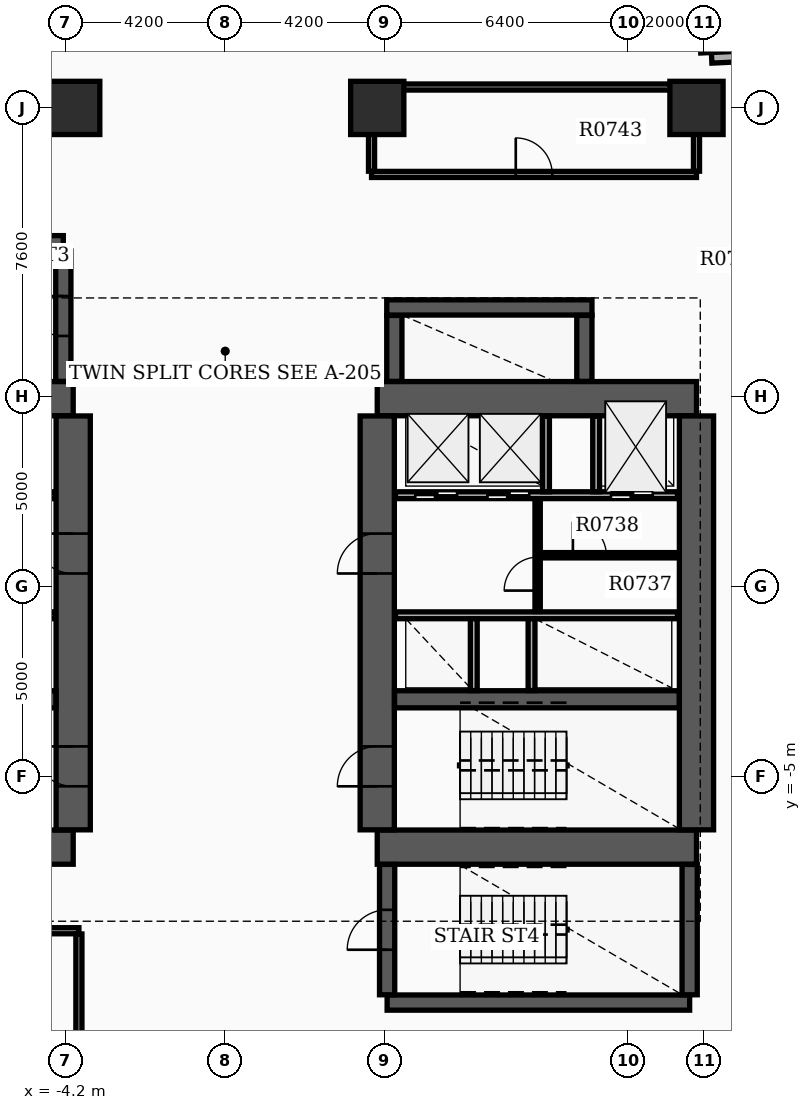
"""IFC4 building model, lengths in metres.
Left out: names, types, materials, properties, quantities, classifications, styles, units other than length and angle.
Written with IfcOpenShell. Run it as: python <this file> out.ifc"""

import sys

from ifc_helpers import new_model, si_unit, direction, frame, frame_2d, origin, origin_2d, place, context, subcontext, project, spatial, rectangle, extrude, element, fill, save


model = new_model("IFC4")
c1 = context("Model", 3, precision=1e-05, world=origin(), true_north=direction((0.0, 1.0)))
c2 = subcontext(c1, "Body", "Model", "MODEL_VIEW")
j1 = project(units=[si_unit("LENGTHUNIT", "METRE"), si_unit("PLANEANGLEUNIT", "RADIAN")], contexts=[c1])
p1 = place(None, origin())
s1 = spatial("IfcSite", under=j1, at=p1, CompositionType="ELEMENT")
p2 = place(p1, origin())
s2 = spatial("IfcBuilding", under=s1, at=p2, CompositionType="ELEMENT")
p3 = place(p2, frame((0.0, 0.0, 52.2)))
s3 = spatial("IfcBuildingStorey", under=s2, at=p3, CompositionType="ELEMENT", Elevation=52.2)
for number, where, z_axis, x_axis in (
    (1, (-12.4, -6.85, 0.0), (0.0, 0.0, 1.0), (1.0, 0.0, 0.0)),
    (2, (-12.4, 4.95, 0.0), (0.0, 0.0, 1.0), (1.0, 0.0, 0.0)),
):
    element("IfcWall", number, at=place(p3, frame(where, z_axis=z_axis, x_axis=x_axis)), inside=s3, PredefinedType="SHEAR", context=c2, shape_type="SweptSolid", body=[
        extrude(rectangle(XDim=8.4, YDim=0.9, at=frame_2d((4.2, 0.0))), origin(), (0.0, 0.0, 1.0), 3.7),
    ])
p4 = place(p3, frame((-4.0, -6.395, 0.0), z_axis=(0.0, 0.0, 1.0), x_axis=(0.0, 1.0, 0.0)))
e3 = element("IfcWall", 3, at=p4, inside=s3, PredefinedType="SHEAR", context=c2, shape_type="SweptSolid", body=[
    extrude(rectangle(XDim=10.89, YDim=0.9, at=frame_2d((5.445, 0.0))), origin(), (0.0, 0.0, 1.0), 3.7),
])
p5 = place(p4, frame((1.145, 0.0, 0.0)))
e4 = element("IfcOpeningElement", 4, at=p5, cuts=e3, PredefinedType="OPENING", context=c2, shape_type="SweptSolid", body=[
    extrude(rectangle(XDim=1.05, YDim=2.15, at=frame_2d((0.525, 1.075))), frame((0.0, 0.46, 0.0), z_axis=(0.0, -1.0, 0.0), x_axis=(1.0, 0.0, 0.0)), (0.0, 0.0, 1.0), 0.92),
])
p6 = place(p4, frame((6.745, 0.0, 0.0)))
e5 = element("IfcOpeningElement", 5, at=p6, cuts=e3, PredefinedType="OPENING", context=c2, shape_type="SweptSolid", body=[
    extrude(rectangle(XDim=1.05, YDim=2.15, at=frame_2d((0.525, 1.075))), frame((0.0, 0.46, 0.0), z_axis=(0.0, -1.0, 0.0), x_axis=(1.0, 0.0, 0.0)), (0.0, 0.0, 1.0), 0.92),
])
p7 = place(p3, frame((-11.945, -2.96, 0.0), z_axis=(0.0, 0.0, 1.0), x_axis=(1.0, 0.0, 0.0)))
e6 = element("IfcWall", 6, at=p7, inside=s3, PredefinedType="SHEAR", context=c2, shape_type="SweptSolid", body=[
    extrude(rectangle(XDim=7.49, YDim=0.45, at=frame_2d((3.745, 0.0))), origin(), (0.0, 0.0, 1.0), 3.7),
])
for number, where, z_axis, x_axis in (
    (7, (4.0, -6.85, 0.0), (0.0, 0.0, 1.0), (1.0, 0.0, 0.0)),
    (8, (4.0, 4.95, 0.0), (0.0, 0.0, 1.0), (1.0, 0.0, 0.0)),
):
    element("IfcWall", number, at=place(p3, frame(where, z_axis=z_axis, x_axis=x_axis)), inside=s3, PredefinedType="SHEAR", context=c2, shape_type="SweptSolid", body=[
        extrude(rectangle(XDim=8.4, YDim=0.9, at=frame_2d((4.2, 0.0))), origin(), (0.0, 0.0, 1.0), 3.7),
    ])
p8 = place(p3, frame((4.0, -6.395, 0.0), z_axis=(0.0, 0.0, 1.0), x_axis=(0.0, 1.0, 0.0)))
e9 = element("IfcWall", 9, at=p8, inside=s3, PredefinedType="SHEAR", context=c2, shape_type="SweptSolid", body=[
    extrude(rectangle(XDim=10.89, YDim=0.9, at=frame_2d((5.445, 0.0))), origin(), (0.0, 0.0, 1.0), 3.7),
])
p9 = place(p8, frame((1.145, 0.0, 0.0)))
e10 = element("IfcOpeningElement", 10, at=p9, cuts=e9, PredefinedType="OPENING", context=c2, shape_type="SweptSolid", body=[
    extrude(rectangle(XDim=1.05, YDim=2.15, at=frame_2d((0.525, 1.075))), frame((0.0, 0.46, 0.0), z_axis=(0.0, -1.0, 0.0), x_axis=(1.0, 0.0, 0.0)), (0.0, 0.0, 1.0), 0.92),
])
p10 = place(p8, frame((6.745, 0.0, 0.0)))
e11 = element("IfcOpeningElement", 11, at=p10, cuts=e9, PredefinedType="OPENING", context=c2, shape_type="SweptSolid", body=[
    extrude(rectangle(XDim=1.05, YDim=2.15, at=frame_2d((0.525, 1.075))), frame((0.0, 0.46, 0.0), z_axis=(0.0, -1.0, 0.0), x_axis=(1.0, 0.0, 0.0)), (0.0, 0.0, 1.0), 0.92),
])
p11 = place(p3, frame((12.4, -6.395, 0.0), z_axis=(0.0, 0.0, 1.0), x_axis=(0.0, 1.0, 0.0)))
e12 = element("IfcWall", 12, at=p11, inside=s3, PredefinedType="SHEAR", context=c2, shape_type="SweptSolid", body=[
    extrude(rectangle(XDim=10.89, YDim=0.9, at=frame_2d((5.445, 0.0))), origin(), (0.0, 0.0, 1.0), 3.7),
])
p12 = place(p3, frame((4.455, -2.96, 0.0), z_axis=(0.0, 0.0, 1.0), x_axis=(1.0, 0.0, 0.0)))
e13 = element("IfcWall", 13, at=p12, inside=s3, PredefinedType="SHEAR", context=c2, shape_type="SweptSolid", body=[
    extrude(rectangle(XDim=7.49, YDim=0.45, at=frame_2d((3.745, 0.0))), origin(), (0.0, 0.0, 1.0), 3.7),
])
p13 = place(p3, frame((-12.22, 9.04, 0.0), z_axis=(0.0, 0.0, 1.0), x_axis=(1.0, 0.0, 0.0)))
e14 = element("IfcWall", 14, at=p13, inside=s3, PredefinedType="SHEAR", context=c2, shape_type="SweptSolid", body=[
    extrude(rectangle(XDim=7.96, YDim=0.4, at=frame_2d((3.98, 0.0))), origin(), (0.0, 0.0, 1.0), 3.7),
])
p14 = place(p3, frame((-4.26, 5.405, 0.0), z_axis=(0.0, 0.0, 1.0), x_axis=(0.0, 1.0, 0.0)))
e15 = element("IfcWall", 15, at=p14, inside=s3, PredefinedType="SHEAR", context=c2, shape_type="SweptSolid", body=[
    extrude(rectangle(XDim=3.43, YDim=0.4, at=frame_2d((1.715, 0.0))), origin(), (0.0, 0.0, 1.0), 3.7),
])
p15 = place(p14, frame((1.195, 0.0, 0.0)))
e16 = element("IfcOpeningElement", 16, at=p15, cuts=e15, PredefinedType="OPENING", context=c2, shape_type="SweptSolid", body=[
    extrude(rectangle(XDim=1.05, YDim=2.15, at=frame_2d((0.525, 1.075))), frame((0.0, 0.21, 0.0), z_axis=(0.0, -1.0, 0.0), x_axis=(1.0, 0.0, 0.0)), (0.0, 0.0, 1.0), 0.42),
])
p16 = place(p3, frame((4.26, -10.94, 0.0), z_axis=(0.0, 0.0, 1.0), x_axis=(1.0, 0.0, 0.0)))
e17 = element("IfcWall", 17, at=p16, inside=s3, PredefinedType="SHEAR", context=c2, shape_type="SweptSolid", body=[
    extrude(rectangle(XDim=7.96, YDim=0.4, at=frame_2d((3.98, 0.0))), origin(), (0.0, 0.0, 1.0), 3.7),
])
p17 = place(p3, frame((4.26, -10.735, 0.0), z_axis=(0.0, 0.0, 1.0), x_axis=(0.0, 1.0, 0.0)))
e18 = element("IfcWall", 18, at=p17, inside=s3, PredefinedType="SHEAR", context=c2, shape_type="SweptSolid", body=[
    extrude(rectangle(XDim=3.43, YDim=0.4, at=frame_2d((1.715, 0.0))), origin(), (0.0, 0.0, 1.0), 3.7),
])
p18 = place(p17, frame((1.185, 0.0, 0.0)))
e19 = element("IfcOpeningElement", 19, at=p18, cuts=e18, PredefinedType="OPENING", context=c2, shape_type="SweptSolid", body=[
    extrude(rectangle(XDim=1.05, YDim=2.15, at=frame_2d((0.525, 1.075))), frame((0.0, 0.21, 0.0), z_axis=(0.0, -1.0, 0.0), x_axis=(1.0, 0.0, 0.0)), (0.0, 0.0, 1.0), 0.42),
])
p19 = place(p3, frame((12.22, -10.735, 0.0), z_axis=(0.0, 0.0, 1.0), x_axis=(0.0, 1.0, 0.0)))
e20 = element("IfcWall", 20, at=p19, inside=s3, PredefinedType="SHEAR", context=c2, shape_type="SweptSolid", body=[
    extrude(rectangle(XDim=3.43, YDim=0.4, at=frame_2d((1.715, 0.0))), origin(), (0.0, 0.0, 1.0), 3.7),
])
p20 = place(p3, frame((4.45, 5.405, 0.0), z_axis=(0.0, 0.0, 1.0), x_axis=(0.0, 1.0, 0.0)))
e21 = element("IfcWall", 21, at=p20, inside=s3, PredefinedType="SHEAR", context=c2, shape_type="SweptSolid", body=[
    extrude(rectangle(XDim=1.735, YDim=0.4, at=frame_2d((0.867, 0.0))), origin(), (0.0, 0.0, 1.0), 3.7),
])
p21 = place(p3, frame((4.25, 7.35, 0.0), z_axis=(0.0, 0.0, 1.0), x_axis=(1.0, 0.0, 0.0)))
e22 = element("IfcWall", 22, at=p21, inside=s3, PredefinedType="SHEAR", context=c2, shape_type="SweptSolid", body=[
    extrude(rectangle(XDim=5.4, YDim=0.4, at=frame_2d((2.7, 0.0))), origin(), (0.0, 0.0, 1.0), 3.7),
])
p22 = place(p3, frame((9.45, 5.405, 0.0), z_axis=(0.0, 0.0, 1.0), x_axis=(0.0, 1.0, 0.0)))
e23 = element("IfcWall", 23, at=p22, inside=s3, PredefinedType="SHEAR", context=c2, shape_type="SweptSolid", body=[
    extrude(rectangle(XDim=1.735, YDim=0.4, at=frame_2d((0.867, 0.0))), origin(), (0.0, 0.0, 1.0), 3.7),
])
for number, where, z_axis, x_axis in (
    (24, (12.4, 12.6, 0.0), (0.0, 0.0, 1.0), (1.0, 0.0, 0.0)),
    (25, (4.0, 12.6, 0.0), (0.0, 0.0, 1.0), (1.0, 0.0, 0.0)),
    (26, (-4.0, 12.6, 0.0), (0.0, 0.0, 1.0), (1.0, 0.0, 0.0)),
):
    element("IfcColumn", number, at=place(p3, frame(where, z_axis=z_axis, x_axis=x_axis)), inside=s3, PredefinedType="COLUMN", context=c2, shape_type="SweptSolid", body=[
        extrude(rectangle(XDim=1.4, YDim=1.4, at=origin_2d()), origin(), (0.0, 0.0, 1.0), 3.9),
    ])
p23 = place(p3, frame((14.017, 13.976, 0.0), z_axis=(0.0, 0.0, 1.0), x_axis=(-0.998883930236, -0.047232339719, 0.0)))
e27 = element("IfcWall", 27, at=p23, inside=s3, PredefinedType="STANDARD", context=c2, shape_type="SweptSolid", body=[
    extrude(rectangle(XDim=1.22, YDim=0.28, at=frame_2d((0.61, 0.0))), origin(), (0.0, 0.0, 1.0), 2.91),
])
p24 = place(p3, frame((12.652, 14.052, 0.0), z_axis=(0.0, 0.0, 1.0), x_axis=(-0.047039284441, 0.99889304018, 0.0)))
e28 = element("IfcWall", 28, at=p24, inside=s3, PredefinedType="STANDARD", context=c2, shape_type="SweptSolid", body=[
    extrude(rectangle(XDim=1.5, YDim=0.28, at=frame_2d((0.75, 0.0))), origin(), (0.0, 0.0, 1.0), 2.91),
])
p25 = place(p3, frame((-11.9, 2.41, 0.0), z_axis=(0.0, 0.0, 1.0), x_axis=(1.0, 0.0, 0.0)))
e29 = element("IfcWall", 29, at=p25, inside=s3, PredefinedType="SOLIDWALL", context=c2, shape_type="SweptSolid", body=[
    extrude(rectangle(XDim=7.42, YDim=0.18, at=frame_2d((3.71, 0.0))), origin(), (0.0, 0.0, 1.0), 2.9),
])
p26 = place(p25, frame((0.55, 0.0, 0.0)))
e30 = element("IfcOpeningElement", 30, at=p26, cuts=e29, PredefinedType="OPENING", context=c2, shape_type="SweptSolid", body=[
    extrude(rectangle(XDim=1.1, YDim=2.15, at=frame_2d((0.55, 1.075))), frame((0.0, 0.1, 0.0), z_axis=(0.0, -1.0, 0.0), x_axis=(1.0, 0.0, 0.0)), (0.0, 0.0, 1.0), 0.2),
])
p27 = place(p25, frame((3.85, 0.0, 0.0)))
e31 = element("IfcOpeningElement", 31, at=p27, cuts=e29, PredefinedType="OPENING", context=c2, shape_type="SweptSolid", body=[
    extrude(rectangle(XDim=1.1, YDim=2.15, at=frame_2d((0.55, 1.075))), frame((0.0, 0.1, 0.0), z_axis=(0.0, -1.0, 0.0), x_axis=(1.0, 0.0, 0.0)), (0.0, 0.0, 1.0), 0.2),
])
p28 = place(p25, frame((5.75, 0.0, 0.0)))
e32 = element("IfcOpeningElement", 32, at=p28, cuts=e29, PredefinedType="OPENING", context=c2, shape_type="SweptSolid", body=[
    extrude(rectangle(XDim=1.1, YDim=2.15, at=frame_2d((0.55, 1.075))), frame((0.0, 0.1, 0.0), z_axis=(0.0, -1.0, 0.0), x_axis=(1.0, 0.0, 0.0)), (0.0, 0.0, 1.0), 0.2),
])
p29 = place(p3, frame((4.48, 2.41, 0.0), z_axis=(0.0, 0.0, 1.0), x_axis=(1.0, 0.0, 0.0)))
e33 = element("IfcWall", 33, at=p29, inside=s3, PredefinedType="SOLIDWALL", context=c2, shape_type="SweptSolid", body=[
    extrude(rectangle(XDim=7.42, YDim=0.18, at=frame_2d((3.71, 0.0))), origin(), (0.0, 0.0, 1.0), 2.9),
])
p30 = place(p29, frame((5.67, 0.0, 0.0)))
e34 = element("IfcOpeningElement", 34, at=p30, cuts=e33, PredefinedType="OPENING", context=c2, shape_type="SweptSolid", body=[
    extrude(rectangle(XDim=1.1, YDim=2.15, at=frame_2d((0.55, 1.075))), frame((0.0, 0.1, 0.0), z_axis=(0.0, -1.0, 0.0), x_axis=(1.0, 0.0, 0.0)), (0.0, 0.0, 1.0), 0.2),
])
p31 = place(p29, frame((0.52, 0.0, 0.0)))
e35 = element("IfcOpeningElement", 35, at=p31, cuts=e33, PredefinedType="OPENING", context=c2, shape_type="SweptSolid", body=[
    extrude(rectangle(XDim=1.1, YDim=2.15, at=frame_2d((0.55, 1.075))), frame((0.0, 0.1, 0.0), z_axis=(0.0, -1.0, 0.0), x_axis=(1.0, 0.0, 0.0)), (0.0, 0.0, 1.0), 0.2),
])
p32 = place(p29, frame((2.42, 0.0, 0.0)))
e36 = element("IfcOpeningElement", 36, at=p32, cuts=e33, PredefinedType="OPENING", context=c2, shape_type="SweptSolid", body=[
    extrude(rectangle(XDim=1.1, YDim=2.15, at=frame_2d((0.55, 1.075))), frame((0.0, 0.1, 0.0), z_axis=(0.0, -1.0, 0.0), x_axis=(1.0, 0.0, 0.0)), (0.0, 0.0, 1.0), 0.2),
])
for number, where, z_axis, x_axis in (
    (37, (-11.9, -0.75, 0.0), (0.0, 0.0, 1.0), (1.0, 0.0, 0.0)),
    (38, (4.48, -0.75, 0.0), (0.0, 0.0, 1.0), (1.0, 0.0, 0.0)),
):
    element("IfcWall", number, at=place(p3, frame(where, z_axis=z_axis, x_axis=x_axis)), inside=s3, PredefinedType="SOLIDWALL", context=c2, shape_type="SweptSolid", body=[
        extrude(rectangle(XDim=7.42, YDim=0.18, at=frame_2d((3.71, 0.0))), origin(), (0.0, 0.0, 1.0), 2.9),
    ])
for number, where, z_axis, x_axis in (
    (39, (8.44, 2.5, 0.0), (0.0, 0.0, 1.0), (0.0, 1.0, 0.0)),
    (40, (9.76, 2.5, 0.0), (0.0, 0.0, 1.0), (0.0, 1.0, 0.0)),
):
    element("IfcWall", number, at=place(p3, frame(where, z_axis=z_axis, x_axis=x_axis)), inside=s3, PredefinedType="SOLIDWALL", context=c2, shape_type="SweptSolid", body=[
        extrude(rectangle(XDim=1.99, YDim=0.18, at=frame_2d((0.995, 0.0))), origin(), (0.0, 0.0, 1.0), 2.9),
    ])
for number, where, z_axis, x_axis in (
    (41, (6.54, -2.73, 0.0), (0.0, 0.0, 1.0), (0.0, 1.0, 0.0)),
    (42, (8.06, -2.73, 0.0), (0.0, 0.0, 1.0), (0.0, 1.0, 0.0)),
):
    element("IfcWall", number, at=place(p3, frame(where, z_axis=z_axis, x_axis=x_axis)), inside=s3, PredefinedType="SOLIDWALL", context=c2, shape_type="SweptSolid", body=[
        extrude(rectangle(XDim=1.89, YDim=0.18, at=frame_2d((0.945, 0.0))), origin(), (0.0, 0.0, 1.0), 2.9),
    ])
p33 = place(p3, frame((8.22, -0.65, 0.0), z_axis=(0.0, 0.0, 1.0), x_axis=(0.0, 1.0, 0.0)))
e43 = element("IfcWall", 43, at=p33, inside=s3, PredefinedType="SOLIDWALL", context=c2, shape_type="SweptSolid", body=[
    extrude(rectangle(XDim=2.96, YDim=0.14, at=frame_2d((1.48, 0.0))), origin(), (0.0, 0.0, 1.0), 2.9),
])
p34 = place(p33, frame((0.55, 0.0, 0.0)))
e44 = element("IfcOpeningElement", 44, at=p34, cuts=e43, PredefinedType="OPENING", context=c2, shape_type="SweptSolid", body=[
    extrude(rectangle(XDim=0.88, YDim=2.1, at=frame_2d((0.44, 1.05))), frame((0.0, 0.08, 0.0), z_axis=(0.0, -1.0, 0.0), x_axis=(1.0, 0.0, 0.0)), (0.0, 0.0, 1.0), 0.16),
])
p35 = place(p3, frame((8.298, 0.83, 0.0), z_axis=(0.0, 0.0, 1.0), x_axis=(1.0, 0.0, 0.0)))
e45 = element("IfcWall", 45, at=p35, inside=s3, PredefinedType="PARTITIONING", context=c2, shape_type="SweptSolid", body=[
    extrude(rectangle(XDim=3.552, YDim=0.14, at=frame_2d((1.776, 0.0))), origin(), (0.0, 0.0, 1.0), 2.9),
])
p36 = place(p35, frame((0.85, 0.0, 0.0)))
e46 = element("IfcOpeningElement", 46, at=p36, cuts=e45, PredefinedType="OPENING", context=c2, shape_type="SweptSolid", body=[
    extrude(rectangle(XDim=0.88, YDim=2.1, at=frame_2d((0.44, 1.05))), frame((0.0, 0.08, 0.0), z_axis=(0.0, -1.0, 0.0), x_axis=(1.0, 0.0, 0.0)), (0.0, 0.0, 1.0), 0.16),
])
p37 = place(p3, frame((3.85, 10.85, 0.0), z_axis=(0.0, 0.0, 1.0), x_axis=(1.0, 0.0, 0.0)))
e47 = element("IfcWall", 47, at=p37, inside=s3, PredefinedType="PARTITIONING", context=c2, shape_type="SweptSolid", body=[
    extrude(rectangle(XDim=8.55, YDim=0.16, at=frame_2d((4.275, 0.0))), origin(), (0.0, 0.0, 1.0), 2.9),
])
p38 = place(p37, frame((3.795, 0.0, 0.0)))
e48 = element("IfcOpeningElement", 48, at=p38, cuts=e47, PredefinedType="OPENING", context=c2, shape_type="SweptSolid", body=[
    extrude(rectangle(XDim=0.96, YDim=2.15, at=frame_2d((0.48, 1.075))), frame((0.0, 0.09, 0.0), z_axis=(0.0, -1.0, 0.0), x_axis=(1.0, 0.0, 0.0)), (0.0, 0.0, 1.0), 0.18),
])
p39 = place(p3, frame((3.85, 13.15, 0.0), z_axis=(0.0, 0.0, 1.0), x_axis=(1.0, 0.0, 0.0)))
e49 = element("IfcWall", 49, at=p39, inside=s3, PredefinedType="PARTITIONING", context=c2, shape_type="SweptSolid", body=[
    extrude(rectangle(XDim=8.55, YDim=0.16, at=frame_2d((4.275, 0.0))), origin(), (0.0, 0.0, 1.0), 2.9),
])
for number, where, z_axis, x_axis in (
    (50, (3.85, 10.935, 0.0), (0.0, 0.0, 1.0), (0.0, 1.0, 0.0)),
    (51, (12.4, 10.935, 0.0), (0.0, 0.0, 1.0), (0.0, 1.0, 0.0)),
):
    element("IfcWall", number, at=place(p3, frame(where, z_axis=z_axis, x_axis=x_axis)), inside=s3, PredefinedType="PARTITIONING", context=c2, shape_type="SweptSolid", body=[
        extrude(rectangle(XDim=2.13, YDim=0.16, at=frame_2d((1.065, 0.0))), origin(), (0.0, 0.0, 1.0), 2.9),
    ])
p40 = place(p3, frame((-12.4, -9.05, 0.0), z_axis=(0.0, 0.0, 1.0), x_axis=(1.0, 0.0, 0.0)))
e52 = element("IfcWall", 52, at=p40, inside=s3, PredefinedType="PARTITIONING", context=c2, shape_type="SweptSolid", body=[
    extrude(rectangle(XDim=8.55, YDim=0.16, at=frame_2d((4.275, 0.0))), origin(), (0.0, 0.0, 1.0), 2.9),
])
p41 = place(p40, frame((3.795, 0.0, 0.0)))
e53 = element("IfcOpeningElement", 53, at=p41, cuts=e52, PredefinedType="OPENING", context=c2, shape_type="SweptSolid", body=[
    extrude(rectangle(XDim=0.96, YDim=2.15, at=frame_2d((0.48, 1.075))), frame((0.0, 0.09, 0.0), z_axis=(0.0, -1.0, 0.0), x_axis=(1.0, 0.0, 0.0)), (0.0, 0.0, 1.0), 0.18),
])
p42 = place(p3, frame((-3.85, -13.065, 0.0), z_axis=(0.0, 0.0, 1.0), x_axis=(0.0, 1.0, 0.0)))
e54 = element("IfcWall", 54, at=p42, inside=s3, PredefinedType="PARTITIONING", context=c2, shape_type="SweptSolid", body=[
    extrude(rectangle(XDim=3.93, YDim=0.16, at=frame_2d((1.965, 0.0))), origin(), (0.0, 0.0, 1.0), 2.9),
])
p43 = place(p5, origin())
e55 = element("IfcDoor", 55, at=p43, inside=s3, OperationType="SINGLE_SWING_RIGHT", PredefinedType="DOOR", context=c2, shape_type="SweptSolid", body=[
    extrude(rectangle(XDim=1.05, YDim=2.15, at=frame_2d((0.525, 1.075))), frame((0.0, 0.025, 0.0), z_axis=(0.0, -1.0, 0.0), x_axis=(1.0, 0.0, 0.0)), (0.0, 0.0, 1.0), 0.05),
])
fill(e4, e55)
p44 = place(p9, origin())
e56 = element("IfcDoor", 56, at=p44, inside=s3, OperationType="SINGLE_SWING_LEFT", PredefinedType="DOOR", context=c2, shape_type="SweptSolid", body=[
    extrude(rectangle(XDim=1.05, YDim=2.15, at=frame_2d((0.525, 1.075))), frame((0.0, 0.025, 0.0), z_axis=(0.0, -1.0, 0.0), x_axis=(1.0, 0.0, 0.0)), (0.0, 0.0, 1.0), 0.05),
])
fill(e10, e56)
p45 = place(p6, origin())
e57 = element("IfcDoor", 57, at=p45, inside=s3, OperationType="SINGLE_SWING_RIGHT", PredefinedType="DOOR", context=c2, shape_type="SweptSolid", body=[
    extrude(rectangle(XDim=1.05, YDim=2.15, at=frame_2d((0.525, 1.075))), frame((0.0, 0.025, 0.0), z_axis=(0.0, -1.0, 0.0), x_axis=(1.0, 0.0, 0.0)), (0.0, 0.0, 1.0), 0.05),
])
fill(e5, e57)
p46 = place(p10, origin())
e58 = element("IfcDoor", 58, at=p46, inside=s3, OperationType="SINGLE_SWING_LEFT", PredefinedType="DOOR", context=c2, shape_type="SweptSolid", body=[
    extrude(rectangle(XDim=1.05, YDim=2.15, at=frame_2d((0.525, 1.075))), frame((0.0, 0.025, 0.0), z_axis=(0.0, -1.0, 0.0), x_axis=(1.0, 0.0, 0.0)), (0.0, 0.0, 1.0), 0.05),
])
fill(e11, e58)
p47 = place(p15, origin())
e59 = element("IfcDoor", 59, at=p47, inside=s3, OperationType="SINGLE_SWING_RIGHT", PredefinedType="DOOR", context=c2, shape_type="SweptSolid", body=[
    extrude(rectangle(XDim=1.05, YDim=2.15, at=frame_2d((0.525, 1.075))), frame((0.0, 0.025, 0.0), z_axis=(0.0, -1.0, 0.0), x_axis=(1.0, 0.0, 0.0)), (0.0, 0.0, 1.0), 0.05),
])
fill(e16, e59)
p48 = place(p18, origin())
e60 = element("IfcDoor", 60, at=p48, inside=s3, OperationType="SINGLE_SWING_LEFT", PredefinedType="DOOR", context=c2, shape_type="SweptSolid", body=[
    extrude(rectangle(XDim=1.05, YDim=2.15, at=frame_2d((0.525, 1.075))), frame((0.0, 0.025, 0.0), z_axis=(0.0, -1.0, 0.0), x_axis=(1.0, 0.0, 0.0)), (0.0, 0.0, 1.0), 0.05),
])
fill(e19, e60)
p49 = place(p30, origin())
e61 = element("IfcDoor", 61, at=p49, inside=s3, OperationType="DOUBLE_DOOR_SLIDING", PredefinedType="DOOR", context=c2, shape_type="SweptSolid", body=[
    extrude(rectangle(XDim=1.1, YDim=2.15, at=frame_2d((0.55, 1.075))), frame((0.0, 0.025, 0.0), z_axis=(0.0, -1.0, 0.0), x_axis=(1.0, 0.0, 0.0)), (0.0, 0.0, 1.0), 0.05),
])
fill(e34, e61)
p50 = place(p31, origin())
e62 = element("IfcDoor", 62, at=p50, inside=s3, OperationType="DOUBLE_DOOR_SLIDING", PredefinedType="DOOR", context=c2, shape_type="SweptSolid", body=[
    extrude(rectangle(XDim=1.1, YDim=2.15, at=frame_2d((0.55, 1.075))), frame((0.0, 0.025, 0.0), z_axis=(0.0, -1.0, 0.0), x_axis=(1.0, 0.0, 0.0)), (0.0, 0.0, 1.0), 0.05),
])
fill(e35, e62)
p51 = place(p32, origin())
e63 = element("IfcDoor", 63, at=p51, inside=s3, OperationType="DOUBLE_DOOR_SLIDING", PredefinedType="DOOR", context=c2, shape_type="SweptSolid", body=[
    extrude(rectangle(XDim=1.1, YDim=2.15, at=frame_2d((0.55, 1.075))), frame((0.0, 0.025, 0.0), z_axis=(0.0, -1.0, 0.0), x_axis=(1.0, 0.0, 0.0)), (0.0, 0.0, 1.0), 0.05),
])
fill(e36, e63)
p52 = place(p34, origin())
e64 = element("IfcDoor", 64, at=p52, inside=s3, OperationType="SINGLE_SWING_LEFT", PredefinedType="DOOR", context=c2, shape_type="SweptSolid", body=[
    extrude(rectangle(XDim=0.88, YDim=2.1, at=frame_2d((0.44, 1.05))), frame((0.0, 0.025, 0.0), z_axis=(0.0, -1.0, 0.0), x_axis=(1.0, 0.0, 0.0)), (0.0, 0.0, 1.0), 0.05),
])
fill(e44, e64)
p53 = place(p36, origin())
e65 = element("IfcDoor", 65, at=p53, inside=s3, OperationType="SINGLE_SWING_LEFT", PredefinedType="DOOR", context=c2, shape_type="SweptSolid", body=[
    extrude(rectangle(XDim=0.88, YDim=2.1, at=frame_2d((0.44, 1.05))), frame((0.0, 0.025, 0.0), z_axis=(0.0, -1.0, 0.0), x_axis=(1.0, 0.0, 0.0)), (0.0, 0.0, 1.0), 0.05),
])
fill(e46, e65)
p54 = place(p38, origin())
e66 = element("IfcDoor", 66, at=p54, inside=s3, OperationType="SINGLE_SWING_LEFT", PredefinedType="DOOR", context=c2, shape_type="SweptSolid", body=[
    extrude(rectangle(XDim=0.96, YDim=2.15, at=frame_2d((0.48, 1.075))), frame((0.0, 0.025, 0.0), z_axis=(0.0, -1.0, 0.0), x_axis=(1.0, 0.0, 0.0)), (0.0, 0.0, 1.0), 0.05),
])
fill(e48, e66)
save(model, sys.argv[1])
